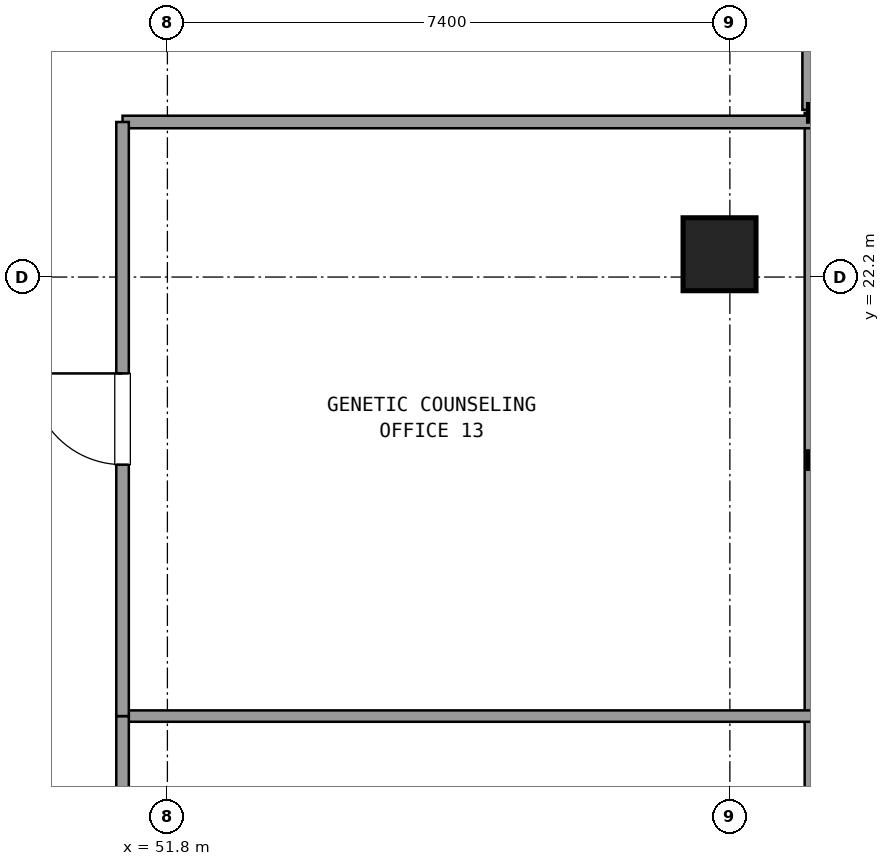
"""IFC4 building model, lengths in metres.
Left out: names, types, materials, properties, quantities, classifications, styles, units other than length and angle.
Written with IfcOpenShell. Run it as: python <this file> out.ifc"""

import sys

from ifc_helpers import new_model, si_unit, direction, frame, frame_2d, origin, origin_2d, place, context, subcontext, project, spatial, rectangle, extrude, element, fill, save


model = new_model("IFC4")
c1 = context("Model", 3, precision=1e-05, world=origin(), true_north=direction((0.0, 1.0)))
c2 = subcontext(c1, "Body", "Model", "MODEL_VIEW")
j1 = project(units=[si_unit("LENGTHUNIT", "METRE"), si_unit("PLANEANGLEUNIT", "RADIAN")], contexts=[c1])
p1 = place(None, origin())
s1 = spatial("IfcSite", under=j1, at=p1, CompositionType="ELEMENT")
p2 = place(p1, origin())
s2 = spatial("IfcBuilding", under=s1, at=p2, CompositionType="ELEMENT")
p3 = place(p2, frame((0.0, 0.0, 160.02)))
s3 = spatial("IfcBuildingStorey", under=s2, at=p3, CompositionType="ELEMENT", Elevation=160.02)
p4 = place(p3, frame((59.064, 22.5, 0.0), z_axis=(0.0, 0.0, 1.0), x_axis=(1.0, 0.0, 0.0)))
e1 = element("IfcColumn", 1, at=p4, inside=s3, PredefinedType="COLUMN", context=c2, shape_type="SweptSolid", body=[
    extrude(rectangle(XDim=0.96, YDim=0.96, at=origin_2d()), origin(), (0.0, 0.0, 1.0), 3.6),
])
p5 = place(p3, frame((60.304, 24.4, 0.0), z_axis=(0.0, 0.0, 1.0), x_axis=(0.0, 1.0, 0.0)))
e2 = element("IfcWall", 2, at=p5, inside=s3, PredefinedType="SOLIDWALL", context=c2, shape_type="SweptSolid", body=[
    extrude(rectangle(XDim=3.0, YDim=0.3, at=frame_2d((1.5, 0.0))), origin(), (0.0, 0.0, 1.0), 2.67),
])
p6 = place(p5, frame((0.9, 0.0, 0.0)))
e3 = element("IfcOpeningElement", 3, at=p6, cuts=e2, PredefinedType="OPENING", context=c2, shape_type="SweptSolid", body=[
    extrude(rectangle(XDim=1.2, YDim=2.2, at=frame_2d((0.6, 1.1))), frame((0.0, 0.16, 0.0), z_axis=(0.0, -1.0, 0.0), x_axis=(1.0, 0.0, 0.0)), (0.0, 0.0, 1.0), 0.32),
])
p7 = place(p3, frame((60.304, 10.655, 0.0), z_axis=(0.0, 0.0, 1.0), x_axis=(0.0, 1.0, 0.0)))
e4 = element("IfcWall", 4, at=p7, inside=s3, PredefinedType="SOLIDWALL", context=c2, shape_type="SweptSolid", body=[
    extrude(rectangle(XDim=13.705, YDim=0.24, at=frame_2d((6.853, 0.0))), origin(), (0.0, 0.0, 1.0), 0.85),
])
p8 = place(p3, frame((51.21, 24.24, 0.0), z_axis=(0.0, 0.0, 1.0), x_axis=(1.0, 0.0, 0.0)))
e5 = element("IfcWall", 5, at=p8, inside=s3, PredefinedType="PARTITIONING", context=c2, shape_type="SweptSolid", body=[
    extrude(rectangle(XDim=9.074, YDim=0.165, at=frame_2d((4.537, 0.0))), origin(), (0.0, 0.0, 1.0), 2.61),
])
p9 = place(p3, frame((51.21, 16.424, 0.0), z_axis=(0.0, 0.0, 1.0), x_axis=(1.0, 0.0, 0.0)))
e6 = element("IfcWall", 6, at=p9, inside=s3, PredefinedType="PARTITIONING", context=c2, shape_type="SweptSolid", body=[
    extrude(rectangle(XDim=9.074, YDim=0.15, at=frame_2d((4.537, 0.0))), origin(), (0.0, 0.0, 1.0), 2.61),
])
p10 = place(p3, frame((51.21, 4.7, 0.0), z_axis=(0.0, 0.0, 1.0), x_axis=(0.0, 1.0, 0.0)))
e7 = element("IfcWall", 7, at=p10, inside=s3, PredefinedType="PARTITIONING", context=c2, shape_type="SweptSolid", body=[
    extrude(rectangle(XDim=11.724, YDim=0.165, at=frame_2d((5.862, 0.0))), origin(), (0.0, 0.0, 1.0), 2.61),
])
p11 = place(p10, frame((5.262, 0.0, 0.0)))
e8 = element("IfcOpeningElement", 8, at=p11, cuts=e7, PredefinedType="OPENING", context=c2, shape_type="SweptSolid", body=[
    extrude(rectangle(XDim=1.2, YDim=2.15, at=frame_2d((0.6, 1.075))), frame((0.0, 0.093, 0.0), z_axis=(0.0, -1.0, 0.0), x_axis=(1.0, 0.0, 0.0)), (0.0, 0.0, 1.0), 0.185),
])
p12 = place(p3, frame((51.21, 16.424, 0.0), z_axis=(0.0, 0.0, 1.0), x_axis=(0.0, 1.0, 0.0)))
e9 = element("IfcWall", 9, at=p12, inside=s3, PredefinedType="PARTITIONING", context=c2, shape_type="SweptSolid", body=[
    extrude(rectangle(XDim=7.816, YDim=0.165, at=frame_2d((3.908, 0.0))), origin(), (0.0, 0.0, 1.0), 2.61),
])
p13 = place(p12, frame((3.308, 0.0, 0.0)))
e10 = element("IfcOpeningElement", 10, at=p13, cuts=e9, PredefinedType="OPENING", context=c2, shape_type="SweptSolid", body=[
    extrude(rectangle(XDim=1.2, YDim=2.15, at=frame_2d((0.6, 1.075))), frame((0.0, 0.093, 0.0), z_axis=(0.0, -1.0, 0.0), x_axis=(1.0, 0.0, 0.0)), (0.0, 0.0, 1.0), 0.185),
])
p14 = place(p13, origin())
e11 = element("IfcDoor", 11, at=p14, inside=s3, OperationType="SINGLE_SWING_RIGHT", PredefinedType="DOOR", context=c2, shape_type="SweptSolid", body=[
    extrude(rectangle(XDim=1.2, YDim=2.15, at=frame_2d((0.6, 1.075))), frame((0.0, 0.025, 0.0), z_axis=(0.0, -1.0, 0.0), x_axis=(1.0, 0.0, 0.0)), (0.0, 0.0, 1.0), 0.05),
])
fill(e10, e11)
save(model, sys.argv[1])
